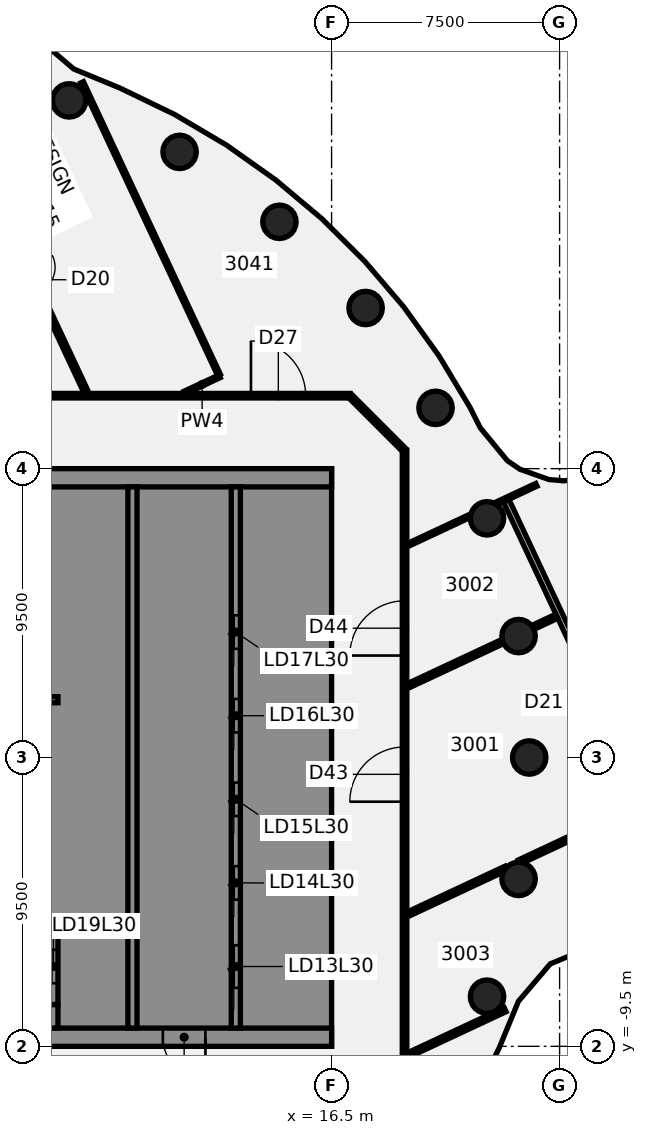
"""IFC4 building model, lengths in metres.
Left out: names, types, materials, properties, quantities, classifications, styles, units other than length and angle.
Written with IfcOpenShell. Run it as: python <this file> out.ifc"""

import sys

from ifc_helpers import new_model, si_unit, direction, frame, frame_2d, origin, origin_2d, place, context, subcontext, project, spatial, polyline, rectangle, circle, outline, extrude, element, fill, save


model = new_model("IFC4")
c1 = context("Model", 3, precision=1e-05, world=origin(), true_north=direction((0.0, 1.0)))
c2 = subcontext(c1, "Body", "Model", "MODEL_VIEW")
j1 = project(units=[si_unit("LENGTHUNIT", "METRE"), si_unit("PLANEANGLEUNIT", "RADIAN")], contexts=[c1])
p1 = place(None, origin())
s1 = spatial("IfcSite", under=j1, at=p1, CompositionType="ELEMENT")
p2 = place(p1, origin())
s2 = spatial("IfcBuilding", under=s1, at=p2, CompositionType="ELEMENT")
p3 = place(p2, frame((0.0, 0.0, 124.75)))
s3 = spatial("IfcBuildingStorey", under=s2, at=p3, CompositionType="ELEMENT", Elevation=124.75)
for number, where, z_axis, x_axis in (
    (1, (23.0, 0.0, -0.14), (0.0, 0.0, 1.0), (1.0, 0.0, 0.0)),
    (2, (22.651, 3.994, -0.14), (0.0, 0.0, 1.0), (1.0, 0.0, 0.0)),
    (3, (21.613, 7.866, -0.14), (0.0, 0.0, 1.0), (1.0, 0.0, 0.0)),
    (4, (19.919, 11.5, -0.14), (0.0, 0.0, 1.0), (1.0, 0.0, 0.0)),
    (5, (17.619, 14.784, -0.14), (0.0, 0.0, 1.0), (1.0, 0.0, 0.0)),
    (6, (14.784, 17.619, -0.14), (0.0, 0.0, 1.0), (1.0, 0.0, 0.0)),
    (7, (11.5, 19.919, -0.14), (0.0, 0.0, 1.0), (1.0, 0.0, 0.0)),
    (8, (7.866, 21.613, -0.14), (0.0, 0.0, 1.0), (1.0, 0.0, 0.0)),
    (9, (21.613, -7.866, -0.14), (0.0, 0.0, 1.0), (1.0, 0.0, 0.0)),
    (10, (22.651, -3.994, -0.14), (0.0, 0.0, 1.0), (1.0, 0.0, 0.0)),
):
    element("IfcColumn", number, at=place(p3, frame(where, z_axis=z_axis, x_axis=x_axis)), inside=s3, PredefinedType="COLUMN", context=c2, shape_type="SweptSolid", body=[
        extrude(circle(Radius=0.55, at=origin_2d()), origin(), (0.0, 0.0, 1.0), 3.71),
    ])
p4 = place(p3, frame((3.644, 22.235, 0.0), z_axis=(0.0, 0.0, 1.0), x_axis=(0.423784513988, -0.905763040593, 0.0)))
e11 = element("IfcWall", 11, at=p4, inside=s3, PredefinedType="PARTITIONING", context=c2, shape_type="SweptSolid", body=[
    extrude(rectangle(XDim=11.311, YDim=0.15, at=frame_2d((5.655, 0.0))), origin(), (0.0, 0.0, 1.0), 2.97),
])
p5 = place(p4, frame((6.75, 0.0, 0.0)))
e12 = element("IfcOpeningElement", 12, at=p5, cuts=e11, PredefinedType="OPENING", context=c2, shape_type="SweptSolid", body=[
    extrude(rectangle(XDim=0.9, YDim=2.1, at=frame_2d((0.45, 1.05))), frame((0.0, 0.085, 0.0), z_axis=(0.0, -1.0, 0.0), x_axis=(1.0, 0.0, 0.0)), (0.0, 0.0, 1.0), 0.17),
])
p6 = place(p3, frame((8.293, 22.208, 0.0), z_axis=(0.0, 0.0, 1.0), x_axis=(0.423833818266, -0.905739970684, 0.0)))
e13 = element("IfcWall", 13, at=p6, inside=s3, PredefinedType="PARTITIONING", context=c2, shape_type="SweptSolid", body=[
    extrude(rectangle(XDim=10.624, YDim=0.1, at=frame_2d((5.312, 0.0))), origin(), (0.0, 0.0, 1.0), 2.97),
])
p7 = place(p3, frame((22.246, 8.44, 0.0), z_axis=(0.0, 0.0, 1.0), x_axis=(0.423833272941, -0.905740225864, 0.0)))
e14 = element("IfcWall", 14, at=p7, inside=s3, PredefinedType="PARTITIONING", context=c2, shape_type="SweptSolid", body=[
    extrude(rectangle(XDim=14.239, YDim=0.2, at=frame_2d((7.119, 0.0))), origin(), (0.0, 0.0, 1.0), 2.87),
])
p8 = place(p7, frame((6.64, 0.0, 0.0)))
e15 = element("IfcOpeningElement", 15, at=p8, cuts=e14, PredefinedType="OPENING", context=c2, shape_type="SweptSolid", body=[
    extrude(rectangle(XDim=1.4, YDim=2.1, at=frame_2d((0.7, 1.05))), frame((0.0, 0.11, 0.0), z_axis=(0.0, -1.0, 0.0), x_axis=(1.0, 0.0, 0.0)), (0.0, 0.0, 1.0), 0.22),
])
p9 = place(p3, frame((17.128, 11.872, 0.0), z_axis=(0.0, 0.0, 1.0), x_axis=(0.707106781187, -0.707106781187, 0.0)))
e16 = element("IfcWall", 16, at=p9, inside=s3, PredefinedType="PARTITIONING", context=c2, shape_type="SweptSolid", body=[
    extrude(rectangle(XDim=2.465, YDim=0.15, at=frame_2d((1.232, 0.0))), origin(), (0.0, 0.0, 1.0), 2.97),
])
p10 = place(p3, frame((-17.065, 11.9, 0.0), z_axis=(0.0, 0.0, 1.0), x_axis=(1.0, 0.0, 0.0)))
e17 = element("IfcWall", 17, at=p10, inside=s3, PredefinedType="PARTITIONING", context=c2, shape_type="SweptSolid", body=[
    extrude(rectangle(XDim=34.165, YDim=0.15, at=frame_2d((17.083, 0.0))), origin(), (0.0, 0.0, 1.0), 2.97),
])
p11 = place(p10, frame((20.887, 0.0, 0.0)))
e18 = element("IfcOpeningElement", 18, at=p11, cuts=e17, PredefinedType="OPENING", context=c2, shape_type="SweptSolid", body=[
    extrude(rectangle(XDim=1.8, YDim=2.1, at=frame_2d((0.9, 1.05))), frame((0.0, 0.085, 0.0), z_axis=(0.0, -1.0, 0.0), x_axis=(1.0, 0.0, 0.0)), (0.0, 0.0, 1.0), 0.17),
])
p12 = place(p10, frame((30.913, 0.0, 0.0)))
e19 = element("IfcOpeningElement", 19, at=p12, cuts=e17, PredefinedType="OPENING", context=c2, shape_type="SweptSolid", body=[
    extrude(rectangle(XDim=1.8, YDim=2.1, at=frame_2d((0.9, 1.05))), frame((0.0, 0.085, 0.0), z_axis=(0.0, -1.0, 0.0), x_axis=(1.0, 0.0, 0.0)), (0.0, 0.0, 1.0), 0.17),
])
p13 = place(p10, frame((5.815, 0.0, 0.0)))
e20 = element("IfcOpeningElement", 20, at=p13, cuts=e17, PredefinedType="OPENING", context=c2, shape_type="SweptSolid", body=[
    extrude(rectangle(XDim=1.8, YDim=2.1, at=frame_2d((0.9, 1.05))), frame((0.0, 0.085, 0.0), z_axis=(0.0, -1.0, 0.0), x_axis=(1.0, 0.0, 0.0)), (0.0, 0.0, 1.0), 0.17),
])
p14 = place(p3, frame((11.666, 12.0, 0.0), z_axis=(0.0, 0.0, 1.0), x_axis=(0.905726309161, 0.423863011942, 0.0)))
e21 = element("IfcWall", 21, at=p14, inside=s3, PredefinedType="PARTITIONING", context=c2, shape_type="SweptSolid", body=[
    extrude(rectangle(XDim=1.271, YDim=0.1, at=frame_2d((0.636, 0.0))), origin(), (0.0, 0.0, 1.0), 2.97),
])
p15 = place(p3, frame((18.99, -9.799, 0.0), z_axis=(0.0, 0.0, 1.0), x_axis=(0.905741880745, 0.42382973641, 0.0)))
e22 = element("IfcWall", 22, at=p15, inside=s3, PredefinedType="PARTITIONING", context=c2, shape_type="SweptSolid", body=[
    extrude(rectangle(XDim=3.552, YDim=0.15, at=frame_2d((1.776, 0.0))), origin(), (0.0, 0.0, 1.0), 2.97),
])
p16 = place(p3, frame((18.99, -5.162, 0.0), z_axis=(0.0, 0.0, 1.0), x_axis=(0.905759778977, 0.423791485034, 0.0)))
e23 = element("IfcWall", 23, at=p16, inside=s3, PredefinedType="PARTITIONING", context=c2, shape_type="SweptSolid", body=[
    extrude(rectangle(XDim=3.584, YDim=0.15, at=frame_2d((1.792, 0.0))), origin(), (0.0, 0.0, 1.0), 2.97),
])
p17 = place(p3, frame((22.671, -3.439, 0.0), z_axis=(0.0, 0.0, 1.0), x_axis=(0.905778318348, 0.423751859005, 0.0)))
e24 = element("IfcWall", 24, at=p17, inside=s3, PredefinedType="PARTITIONING", context=c2, shape_type="SweptSolid", body=[
    extrude(rectangle(XDim=4.55, YDim=0.15, at=frame_2d((2.275, 0.0))), origin(), (0.0, 0.0, 1.0), 2.97),
])
p18 = place(p17, frame((2.4, 0.0, 0.0)))
e25 = element("IfcOpeningElement", 25, at=p18, cuts=e24, PredefinedType="OPENING", context=c2, shape_type="SweptSolid", body=[
    extrude(rectangle(XDim=0.9, YDim=2.1, at=frame_2d((0.45, 1.05))), frame((0.0, 0.085, 0.0), z_axis=(0.0, -1.0, 0.0), x_axis=(1.0, 0.0, 0.0)), (0.0, 0.0, 1.0), 0.17),
])
p19 = place(p3, frame((18.99, 2.345, 0.0), z_axis=(0.0, 0.0, 1.0), x_axis=(0.90574646987, 0.423819929118, 0.0)))
e26 = element("IfcWall", 26, at=p19, inside=s3, PredefinedType="PARTITIONING", context=c2, shape_type="SweptSolid", body=[
    extrude(rectangle(XDim=3.475, YDim=0.15, at=frame_2d((1.737, 0.0))), origin(), (0.0, 0.0, 1.0), 2.97),
])
p20 = place(p3, frame((23.128, 4.281, 0.0), z_axis=(0.0, 0.0, 1.0), x_axis=(0.905713311234, 0.423890785289, 0.0)))
e27 = element("IfcWall", 27, at=p20, inside=s3, PredefinedType="PARTITIONING", context=c2, shape_type="SweptSolid", body=[
    extrude(rectangle(XDim=0.864, YDim=0.15, at=frame_2d((0.432, 0.0))), origin(), (0.0, 0.0, 1.0), 2.87),
])
p21 = place(p3, frame((18.977, 6.976, 0.0), z_axis=(0.0, 0.0, 1.0), x_axis=(0.905746977705, 0.423818843822, 0.0)))
e28 = element("IfcWall", 28, at=p21, inside=s3, PredefinedType="PARTITIONING", context=c2, shape_type="SweptSolid", body=[
    extrude(rectangle(XDim=2.319, YDim=0.1, at=frame_2d((1.16, 0.0))), origin(), (0.0, 0.0, 1.0), 2.97),
])
p22 = place(p3, frame((21.9, 8.344, 0.0), z_axis=(0.0, 0.0, 1.0), x_axis=(0.905742946236, 0.423827459403, 0.0)))
e29 = element("IfcWall", 29, at=p22, inside=s3, PredefinedType="PARTITIONING", context=c2, shape_type="SweptSolid", body=[
    extrude(rectangle(XDim=1.475, YDim=0.1, at=frame_2d((0.738, 0.0))), origin(), (0.0, 0.0, 1.0), 2.97),
])
p23 = place(p3, frame((18.9, -10.1, 0.0), z_axis=(0.0, 0.0, 1.0), x_axis=(0.0, 1.0, 0.0)))
e30 = element("IfcWall", 30, at=p23, inside=s3, PredefinedType="PARTITIONING", context=c2, shape_type="SweptSolid", body=[
    extrude(rectangle(XDim=20.2, YDim=0.15, at=frame_2d((10.1, 0.0))), origin(), (0.0, 0.0, 1.0), 2.97),
])
p24 = place(p23, frame((8.646, 0.0, 0.0)))
e31 = element("IfcOpeningElement", 31, at=p24, cuts=e30, PredefinedType="OPENING", context=c2, shape_type="SweptSolid", body=[
    extrude(rectangle(XDim=1.8, YDim=2.1, at=frame_2d((0.9, 1.05))), frame((0.0, 0.085, 0.0), z_axis=(0.0, -1.0, 0.0), x_axis=(1.0, 0.0, 0.0)), (0.0, 0.0, 1.0), 0.17),
])
p25 = place(p23, frame((13.453, 0.0, 0.0)))
e32 = element("IfcOpeningElement", 32, at=p25, cuts=e30, PredefinedType="OPENING", context=c2, shape_type="SweptSolid", body=[
    extrude(rectangle(XDim=1.8, YDim=2.1, at=frame_2d((0.9, 1.05))), frame((0.0, 0.085, 0.0), z_axis=(0.0, -1.0, 0.0), x_axis=(1.0, 0.0, 0.0)), (0.0, 0.0, 1.0), 0.17),
])
p26 = place(p3, frame((16.5, -9.2, 0.0), z_axis=(0.0, 0.0, 1.0), x_axis=(-1.0, 0.0, 0.0)))
e33 = element("IfcWall", 33, at=p26, inside=s3, PredefinedType="SHEAR", context=c2, shape_type="SweptSolid", body=[
    extrude(rectangle(XDim=13.0, YDim=0.6, at=frame_2d((6.5, 0.0))), origin(), (0.0, 0.0, 1.0), 3.57),
])
p27 = place(p26, frame((4.15, 0.0, 0.0)))
e34 = element("IfcOpeningElement", 34, at=p27, cuts=e33, PredefinedType="OPENING", context=c2, shape_type="SweptSolid", body=[
    extrude(rectangle(XDim=1.4, YDim=2.1, at=frame_2d((0.7, 1.05))), frame((0.0, 0.31, 0.0), z_axis=(0.0, -1.0, 0.0), x_axis=(1.0, 0.0, 0.0)), (0.0, 0.0, 1.0), 0.62),
])
p28 = place(p26, frame((10.125, 0.0, 0.0)))
e35 = element("IfcOpeningElement", 35, at=p28, cuts=e33, PredefinedType="OPENING", context=c2, shape_type="SweptSolid", body=[
    extrude(rectangle(XDim=1.4, YDim=2.1, at=frame_2d((0.7, 1.05))), frame((0.0, 0.31, 0.0), z_axis=(0.0, -1.0, 0.0), x_axis=(1.0, 0.0, 0.0)), (0.0, 0.0, 1.0), 0.62),
])
p29 = place(p3, origin())
e36 = element("IfcWall", 36, at=p29, inside=s3, PredefinedType="SHEAR", context=c2, shape_type="SweptSolid", body=[
    extrude(outline(polyline([(13.5, -8.9), (15.9, -8.9), (16.5, -8.9), (16.5, 8.9), (15.9, 8.9), (13.5, 8.9), (13.5, 8.125), (15.9, 8.125), (15.9, 5.625), (13.5, 5.625), (13.5, 5.375), (15.9, 5.375), (15.9, 2.875), (13.5, 2.875), (13.5, 2.625), (15.9, 2.625), (15.9, 0.125), (13.5, 0.125), (13.5, -0.125), (15.9, -0.125), (15.9, -2.625), (13.5, -2.625), (13.5, -2.875), (15.9, -2.875), (15.9, -5.375), (13.5, -5.375), (13.5, -5.625), (15.9, -5.625), (15.9, -8.125), (13.5, -8.125), (13.5, -8.9)])), origin(), (0.0, 0.0, 1.0), 3.57),
])
p30 = place(p3, frame((16.5, 9.2, 0.0), z_axis=(0.0, 0.0, 1.0), x_axis=(-1.0, 0.0, 0.0)))
e37 = element("IfcWall", 37, at=p30, inside=s3, PredefinedType="SHEAR", context=c2, shape_type="SweptSolid", body=[
    extrude(rectangle(XDim=13.0, YDim=0.6, at=frame_2d((6.5, 0.0))), origin(), (0.0, 0.0, 1.0), 3.57),
])
p31 = place(p3, origin())
e38 = element("IfcWall", 38, at=p31, inside=s3, PredefinedType="SHEAR", context=c2, shape_type="SweptSolid", body=[
    extrude(outline(polyline([(9.8, -5.375), (7.5, -5.375), (7.5, -2.875), (9.8, -2.875), (9.8, -2.625), (7.5, -2.625), (7.5, -0.125), (9.8, -0.125), (9.8, 0.125), (7.5, 0.125), (7.5, 2.625), (9.8, 2.625), (9.8, 2.875), (7.5, 2.875), (7.5, 5.375), (9.8, 5.375), (9.8, 5.625), (7.5, 5.625), (7.5, 8.125), (9.8, 8.125), (9.8, 8.9), (7.5, 8.9), (7.2, 8.9), (7.2, -5.625), (7.5, -5.625), (9.8, -5.625), (9.8, -5.375)])), origin(), (0.0, 0.0, 1.0), 3.57),
])
p32 = place(p3, origin())
e39 = element("IfcWall", 39, at=p32, inside=s3, PredefinedType="SHEAR", context=c2, shape_type="SweptSolid", body=[
    extrude(outline(polyline([(7.5, -8.125), (7.5, -8.9), (9.8, -8.9), (9.8, -8.125), (9.8, -5.625), (9.55, -5.625), (9.55, -8.125), (7.5, -8.125)])), origin(), (0.0, 0.0, 1.0), 3.57),
])
p33 = place(p3, frame((7.35, -8.9, 0.0), z_axis=(0.0, 0.0, 1.0), x_axis=(0.0, 1.0, 0.0)))
e40 = element("IfcWall", 40, at=p33, inside=s3, PredefinedType="SHEAR", context=c2, shape_type="SweptSolid", body=[
    extrude(rectangle(XDim=0.775, YDim=0.3, at=frame_2d((0.387, 0.0))), origin(), (0.0, 0.0, 1.0), 3.57),
])
p34 = place(p3, frame((7.5, 1.9, 0.0), z_axis=(0.0, 0.0, 1.0), x_axis=(-1.0, 0.0, 0.0)))
e41 = element("IfcWall", 41, at=p34, inside=s3, PredefinedType="SHEAR", context=c2, shape_type="SweptSolid", body=[
    extrude(rectangle(XDim=3.3, YDim=0.2, at=frame_2d((1.65, 0.0))), origin(), (0.0, 0.0, 1.0), 3.57),
])
p35 = place(p3, frame((13.35, -8.9, 0.0), z_axis=(0.0, 0.0, 1.0), x_axis=(0.0, 1.0, 0.0)))
e42 = element("IfcWall", 42, at=p35, inside=s3, PredefinedType="SHEAR", context=c2, shape_type="SweptSolid", body=[
    extrude(rectangle(XDim=17.8, YDim=0.3, at=frame_2d((8.9, 0.0))), origin(), (0.0, 0.0, 1.0), 3.57),
])
p36 = place(p35, frame((1.325, 0.0, 0.0)))
e43 = element("IfcOpeningElement", 43, at=p36, cuts=e42, PredefinedType="OPENING", context=c2, shape_type="SweptSolid", body=[
    extrude(rectangle(XDim=1.4, YDim=2.1, at=frame_2d((0.7, 1.05))), frame((0.0, 0.16, 0.0), z_axis=(0.0, -1.0, 0.0), x_axis=(1.0, 0.0, 0.0)), (0.0, 0.0, 1.0), 0.32),
])
p37 = place(p35, frame((4.225, 0.0, 0.0)))
e44 = element("IfcOpeningElement", 44, at=p37, cuts=e42, PredefinedType="OPENING", context=c2, shape_type="SweptSolid", body=[
    extrude(rectangle(XDim=1.1, YDim=2.1, at=frame_2d((0.55, 1.05))), frame((0.0, 0.16, 0.0), z_axis=(0.0, -1.0, 0.0), x_axis=(1.0, 0.0, 0.0)), (0.0, 0.0, 1.0), 0.32),
])
p38 = place(p35, frame((6.975, 0.0, 0.0)))
e45 = element("IfcOpeningElement", 45, at=p38, cuts=e42, PredefinedType="OPENING", context=c2, shape_type="SweptSolid", body=[
    extrude(rectangle(XDim=1.1, YDim=2.1, at=frame_2d((0.55, 1.05))), frame((0.0, 0.16, 0.0), z_axis=(0.0, -1.0, 0.0), x_axis=(1.0, 0.0, 0.0)), (0.0, 0.0, 1.0), 0.32),
])
p39 = place(p35, frame((9.725, 0.0, 0.0)))
e46 = element("IfcOpeningElement", 46, at=p39, cuts=e42, PredefinedType="OPENING", context=c2, shape_type="SweptSolid", body=[
    extrude(rectangle(XDim=1.1, YDim=2.1, at=frame_2d((0.55, 1.05))), frame((0.0, 0.16, 0.0), z_axis=(0.0, -1.0, 0.0), x_axis=(1.0, 0.0, 0.0)), (0.0, 0.0, 1.0), 0.32),
])
p40 = place(p35, frame((12.475, 0.0, 0.0)))
e47 = element("IfcOpeningElement", 47, at=p40, cuts=e42, PredefinedType="OPENING", context=c2, shape_type="SweptSolid", body=[
    extrude(rectangle(XDim=1.1, YDim=2.1, at=frame_2d((0.55, 1.05))), frame((0.0, 0.16, 0.0), z_axis=(0.0, -1.0, 0.0), x_axis=(1.0, 0.0, 0.0)), (0.0, 0.0, 1.0), 0.32),
])
p41 = place(p3, frame((9.95, -8.9, 0.0), z_axis=(0.0, 0.0, 1.0), x_axis=(0.0, 1.0, 0.0)))
e48 = element("IfcWall", 48, at=p41, inside=s3, PredefinedType="SHEAR", context=c2, shape_type="SweptSolid", body=[
    extrude(rectangle(XDim=17.8, YDim=0.3, at=frame_2d((8.9, 0.0))), origin(), (0.0, 0.0, 1.0), 3.57),
])
p42 = place(p3, frame((7.35, -8.125, 0.0), z_axis=(0.0, 0.0, 1.0), x_axis=(0.0, 1.0, 0.0)))
e49 = element("IfcWall", 49, at=p42, inside=s3, PredefinedType="SHEAR", context=c2, shape_type="SweptSolid", body=[
    extrude(rectangle(XDim=2.5, YDim=0.3, at=frame_2d((1.25, 0.0))), origin(), (0.0, 0.0, 1.0), 3.57),
])
p43 = place(p42, frame((0.7, 0.0, 0.0)))
e50 = element("IfcOpeningElement", 50, at=p43, cuts=e49, PredefinedType="OPENING", context=c2, shape_type="SweptSolid", body=[
    extrude(rectangle(XDim=1.1, YDim=2.1, at=frame_2d((0.55, 1.05))), frame((0.0, 0.16, 0.0), z_axis=(0.0, -1.0, 0.0), x_axis=(1.0, 0.0, 0.0)), (0.0, 0.0, 1.0), 0.32),
])
p44 = place(p12, origin())
e51 = element("IfcDoor", 51, at=p44, inside=s3, OperationType="DOUBLE_DOOR_SINGLE_SWING", PredefinedType="DOOR", context=c2, shape_type="SweptSolid", body=[
    extrude(rectangle(XDim=1.8, YDim=2.1, at=frame_2d((0.9, 1.05))), frame((0.0, 0.025, 0.0), z_axis=(0.0, -1.0, 0.0), x_axis=(1.0, 0.0, 0.0)), (0.0, 0.0, 1.0), 0.05),
])
fill(e19, e51)
p45 = place(p24, origin())
e52 = element("IfcDoor", 52, at=p45, inside=s3, OperationType="DOUBLE_DOOR_SINGLE_SWING", PredefinedType="DOOR", context=c2, shape_type="SweptSolid", body=[
    extrude(rectangle(XDim=1.8, YDim=2.1, at=frame_2d((0.9, 1.05))), frame((0.0, 0.025, 0.0), z_axis=(0.0, -1.0, 0.0), x_axis=(1.0, 0.0, 0.0)), (0.0, 0.0, 1.0), 0.05),
])
fill(e31, e52)
p46 = place(p25, frame((1.8, 0.0, 0.0), z_axis=(0.0, 0.0, 1.0), x_axis=(-1.0, 0.0, 0.0)))
e53 = element("IfcDoor", 53, at=p46, inside=s3, OperationType="DOUBLE_DOOR_SINGLE_SWING", PredefinedType="DOOR", context=c2, shape_type="SweptSolid", body=[
    extrude(rectangle(XDim=1.8, YDim=2.1, at=frame_2d((0.9, 1.05))), frame((0.0, 0.025, 0.0), z_axis=(0.0, -1.0, 0.0), x_axis=(1.0, 0.0, 0.0)), (0.0, 0.0, 1.0), 0.05),
])
fill(e32, e53)
p47 = place(p27, origin())
e54 = element("IfcDoor", 54, at=p47, inside=s3, OperationType="SINGLE_SWING_LEFT", PredefinedType="DOOR", context=c2, shape_type="SweptSolid", body=[
    extrude(rectangle(XDim=1.4, YDim=2.1, at=frame_2d((0.7, 1.05))), frame((0.0, 0.025, 0.0), z_axis=(0.0, -1.0, 0.0), x_axis=(1.0, 0.0, 0.0)), (0.0, 0.0, 1.0), 0.05),
])
fill(e34, e54)
p48 = place(p36, origin())
e55 = element("IfcDoor", 55, at=p48, inside=s3, OperationType="SLIDING_TO_LEFT", PredefinedType="DOOR", context=c2, shape_type="SweptSolid", body=[
    extrude(rectangle(XDim=1.4, YDim=2.1, at=frame_2d((0.7, 1.05))), frame((0.0, 0.025, 0.0), z_axis=(0.0, -1.0, 0.0), x_axis=(1.0, 0.0, 0.0)), (0.0, 0.0, 1.0), 0.05),
])
fill(e43, e55)
p49 = place(p37, origin())
e56 = element("IfcDoor", 56, at=p49, inside=s3, OperationType="SLIDING_TO_LEFT", PredefinedType="DOOR", context=c2, shape_type="SweptSolid", body=[
    extrude(rectangle(XDim=1.1, YDim=2.1, at=frame_2d((0.55, 1.05))), frame((0.0, 0.025, 0.0), z_axis=(0.0, -1.0, 0.0), x_axis=(1.0, 0.0, 0.0)), (0.0, 0.0, 1.0), 0.05),
])
fill(e44, e56)
p50 = place(p38, origin())
e57 = element("IfcDoor", 57, at=p50, inside=s3, OperationType="SLIDING_TO_LEFT", PredefinedType="DOOR", context=c2, shape_type="SweptSolid", body=[
    extrude(rectangle(XDim=1.1, YDim=2.1, at=frame_2d((0.55, 1.05))), frame((0.0, 0.025, 0.0), z_axis=(0.0, -1.0, 0.0), x_axis=(1.0, 0.0, 0.0)), (0.0, 0.0, 1.0), 0.05),
])
fill(e45, e57)
p51 = place(p39, origin())
e58 = element("IfcDoor", 58, at=p51, inside=s3, OperationType="SLIDING_TO_LEFT", PredefinedType="DOOR", context=c2, shape_type="SweptSolid", body=[
    extrude(rectangle(XDim=1.1, YDim=2.1, at=frame_2d((0.55, 1.05))), frame((0.0, 0.025, 0.0), z_axis=(0.0, -1.0, 0.0), x_axis=(1.0, 0.0, 0.0)), (0.0, 0.0, 1.0), 0.05),
])
fill(e46, e58)
p52 = place(p40, origin())
e59 = element("IfcDoor", 59, at=p52, inside=s3, OperationType="SLIDING_TO_LEFT", PredefinedType="DOOR", context=c2, shape_type="SweptSolid", body=[
    extrude(rectangle(XDim=1.1, YDim=2.1, at=frame_2d((0.55, 1.05))), frame((0.0, 0.025, 0.0), z_axis=(0.0, -1.0, 0.0), x_axis=(1.0, 0.0, 0.0)), (0.0, 0.0, 1.0), 0.05),
])
fill(e47, e59)
p53 = place(p43, origin())
e60 = element("IfcDoor", 60, at=p53, inside=s3, OperationType="SLIDING_TO_LEFT", PredefinedType="DOOR", context=c2, shape_type="SweptSolid", body=[
    extrude(rectangle(XDim=1.1, YDim=2.1, at=frame_2d((0.55, 1.05))), frame((0.0, 0.025, 0.0), z_axis=(0.0, -1.0, 0.0), x_axis=(1.0, 0.0, 0.0)), (0.0, 0.0, 1.0), 0.05),
])
fill(e50, e60)
save(model, sys.argv[1])
